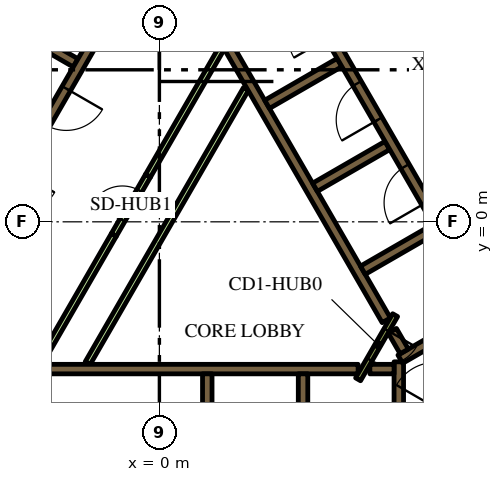
"""IFC4 building model, lengths in metres.
Left out: names, types, materials, properties, quantities, classifications, styles, units other than length and angle.
Written with IfcOpenShell. Run it as: python <this file> out.ifc"""

import sys

from ifc_helpers import new_model, si_unit, direction, frame, frame_2d, origin, place, context, subcontext, project, spatial, rectangle, extrude, element, fill, save


model = new_model("IFC4")
c1 = context("Model", 3, precision=1e-05, world=origin(), true_north=direction((0.0, 1.0)))
c2 = subcontext(c1, "Body", "Model", "MODEL_VIEW")
j1 = project(units=[si_unit("LENGTHUNIT", "METRE"), si_unit("PLANEANGLEUNIT", "RADIAN")], contexts=[c1])
p1 = place(None, origin())
s1 = spatial("IfcSite", under=j1, at=p1, CompositionType="ELEMENT")
p2 = place(p1, origin())
s2 = spatial("IfcBuilding", under=s1, at=p2, CompositionType="ELEMENT")
p3 = place(p2, frame((0.0, 0.0, 300.6)))
s3 = spatial("IfcBuildingStorey", under=s2, at=p3, CompositionType="ELEMENT", Elevation=300.6)
p4 = place(p3, frame((6.3, -7.24, 0.0), z_axis=(0.0, 0.0, 1.0), x_axis=(0.0, 1.0, 0.0)))
e1 = element("IfcWall", 1, at=p4, inside=s3, PredefinedType="SOLIDWALL", context=c2, shape_type="SweptSolid", body=[
    extrude(rectangle(XDim=3.556, YDim=0.25, at=frame_2d((1.778, 0.0))), origin(), (0.0, 0.0, 1.0), 4.2),
])
p5 = place(p3, frame((5.538, -3.875, 0.0), z_axis=(0.0, 0.0, 1.0), x_axis=(1.0, 0.0, 0.0)))
e2 = element("IfcWall", 2, at=p5, inside=s3, PredefinedType="SOLIDWALL", context=c2, shape_type="SweptSolid", body=[
    extrude(rectangle(XDim=0.637, YDim=0.25, at=frame_2d((0.318, 0.0))), origin(), (0.0, 0.0, 1.0), 4.2),
])
p6 = place(p3, frame((-5.259, -3.875, 0.0), z_axis=(0.0, 0.0, 1.0), x_axis=(1.0, 0.0, 0.0)))
e3 = element("IfcWall", 3, at=p6, inside=s3, PredefinedType="SOLIDWALL", context=c2, shape_type="SweptSolid", body=[
    extrude(rectangle(XDim=10.489, YDim=0.25, at=frame_2d((5.244, 0.0))), origin(), (0.0, 0.0, 1.0), 4.2),
])
for number, where, z_axis, x_axis in (
    (4, (1.26, -4.0, 0.0), (0.0, 0.0, 1.0), (0.0, -1.0, 0.0)),
    (5, (3.78, -4.0, 0.0), (0.0, 0.0, 1.0), (0.0, -1.0, 0.0)),
):
    element("IfcWall", number, at=place(p3, frame(where, z_axis=z_axis, x_axis=x_axis)), inside=s3, PredefinedType="SOLIDWALL", context=c2, shape_type="SweptSolid", body=[
        extrude(rectangle(XDim=2.2, YDim=0.25, at=frame_2d((1.1, 0.0))), origin(), (0.0, 0.0, 1.0), 4.2),
    ])
p7 = place(p3, frame((9.19, -1.969, 0.0), z_axis=(0.0, 0.0, 1.0), x_axis=(-0.866057109641, -0.499945079824, 0.0)))
e6 = element("IfcWall", 6, at=p7, inside=s3, PredefinedType="SOLIDWALL", context=c2, shape_type="SweptSolid", body=[
    extrude(rectangle(XDim=3.291, YDim=0.25, at=frame_2d((1.646, 0.0))), origin(), (0.0, 0.0, 1.0), 4.2),
])
p8 = place(p3, frame((6.13, -2.867, 0.0), z_axis=(0.0, 0.0, 1.0), x_axis=(0.500160776593, -0.865932559475, 0.0)))
e7 = element("IfcWall", 7, at=p8, inside=s3, PredefinedType="SOLIDWALL", context=c2, shape_type="SweptSolid", body=[
    extrude(rectangle(XDim=0.627, YDim=0.25, at=frame_2d((0.313, 0.0))), origin(), (0.0, 0.0, 1.0), 4.2),
])
p9 = place(p3, frame((5.97, -2.591, 0.0), z_axis=(0.0, 0.0, 1.0), x_axis=(-0.499994469932, 0.866028596547, 0.0)))
e8 = element("IfcWall", 8, at=p9, inside=s3, PredefinedType="SOLIDWALL", context=c2, shape_type="SweptSolid", body=[
    extrude(rectangle(XDim=10.488, YDim=0.25, at=frame_2d((5.244, 0.0))), origin(), (0.0, 0.0, 1.0), 4.2),
])
for number, where, z_axis, x_axis in (
    (9, (2.834, 3.091, 0.0), (0.0, 0.0, 1.0), (0.866, 0.5, 0.0)),
    (10, (4.094, 0.909, 0.0), (0.0, 0.0, 1.0), (0.866, 0.5, 0.0)),
    (11, (5.354, -1.274, 0.0), (0.0, 0.0, 1.0), (0.866, 0.5, 0.0)),
):
    element("IfcWall", number, at=place(p3, frame(where, z_axis=z_axis, x_axis=x_axis)), inside=s3, PredefinedType="SOLIDWALL", context=c2, shape_type="SweptSolid", body=[
        extrude(rectangle(XDim=2.2, YDim=0.25, at=frame_2d((1.1, 0.0))), origin(), (0.0, 0.0, 1.0), 4.2),
    ])
p10 = place(p3, frame((-8.06, -1.311, 0.0), z_axis=(0.0, 0.0, 1.0), x_axis=(0.50000273126, 0.866023826885, 0.0)))
e12 = element("IfcWall", 12, at=p10, inside=s3, PredefinedType="SOLIDWALL", context=c2, shape_type="SweptSolid", body=[
    extrude(rectangle(XDim=10.33, YDim=0.25, at=frame_2d((5.165, 0.0))), origin(), (0.0, 0.0, 1.0), 4.2),
])
p11 = place(p3, frame((-2.204, 4.182, 0.0), z_axis=(0.0, 0.0, 1.0), x_axis=(-0.866008176907, 0.50002983664, 0.0)))
e13 = element("IfcWall", 13, at=p11, inside=s3, PredefinedType="SOLIDWALL", context=c2, shape_type="SweptSolid", body=[
    extrude(rectangle(XDim=2.2, YDim=0.25, at=frame_2d((1.1, 0.0))), origin(), (0.0, 0.0, 1.0), 4.2),
])
p12 = place(p3, frame((-1.887, -3.718, 0.0), z_axis=(0.0, 0.0, 1.0), x_axis=(0.500005008002, 0.866022512394, 0.0)))
e14 = element("IfcWall", 14, at=p12, inside=s3, PredefinedType="PARTITIONING", context=c2, shape_type="SweptSolid", body=[
    extrude(rectangle(XDim=8.327, YDim=0.15, at=frame_2d((4.164, 0.0))), origin(), (0.0, 0.0, 1.0), 3.55),
])
p13 = place(p3, frame((-3.147, -3.718, 0.0), z_axis=(0.0, 0.0, 1.0), x_axis=(0.500010131483, 0.866019554291, 0.0)))
e15 = element("IfcWall", 15, at=p13, inside=s3, PredefinedType="PARTITIONING", context=c2, shape_type="SweptSolid", body=[
    extrude(rectangle(XDim=3.894, YDim=0.15, at=frame_2d((1.947, 0.0))), origin(), (0.0, 0.0, 1.0), 3.55),
])
p14 = place(p3, frame((-0.3, 1.212, 0.0), z_axis=(0.0, 0.0, 1.0), x_axis=(0.499963101113, 0.866046706318, 0.0)))
e16 = element("IfcWall", 16, at=p14, inside=s3, PredefinedType="PARTITIONING", context=c2, shape_type="SweptSolid", body=[
    extrude(rectangle(XDim=3.893, YDim=0.15, at=frame_2d((1.947, 0.0))), origin(), (0.0, 0.0, 1.0), 3.55),
])
p15 = place(p3, frame((8.565, -2.185, 0.0), z_axis=(0.0, 0.0, 1.0), x_axis=(-0.499997954832, 0.866026584559, 0.0)))
e17 = element("IfcWall", 17, at=p15, inside=s3, PredefinedType="SOLIDWALL", context=c2, shape_type="SweptSolid", body=[
    extrude(rectangle(XDim=12.35, YDim=0.25, at=frame_2d((6.175, 0.0))), origin(), (0.0, 0.0, 1.0), 4.2),
])
p16 = place(p15, frame((0.685, 0.0, 0.0)))
e18 = element("IfcOpeningElement", 18, at=p16, cuts=e17, PredefinedType="OPENING", context=c2, shape_type="SweptSolid", body=[
    extrude(rectangle(XDim=0.9, YDim=2.1, at=frame_2d((0.45, 1.05))), frame((0.0, 0.135, 0.0), z_axis=(0.0, -1.0, 0.0), x_axis=(1.0, 0.0, 0.0)), (0.0, 0.0, 1.0), 0.27),
])
p17 = place(p15, frame((3.105, 0.0, 0.0)))
e19 = element("IfcOpeningElement", 19, at=p17, cuts=e17, PredefinedType="OPENING", context=c2, shape_type="SweptSolid", body=[
    extrude(rectangle(XDim=1.1, YDim=2.1, at=frame_2d((0.55, 1.05))), frame((0.0, 0.135, 0.0), z_axis=(0.0, -1.0, 0.0), x_axis=(1.0, 0.0, 0.0)), (0.0, 0.0, 1.0), 0.27),
])
p18 = place(p15, frame((5.625, 0.0, 0.0)))
e20 = element("IfcOpeningElement", 20, at=p18, cuts=e17, PredefinedType="OPENING", context=c2, shape_type="SweptSolid", body=[
    extrude(rectangle(XDim=1.1, YDim=2.1, at=frame_2d((0.55, 1.05))), frame((0.0, 0.135, 0.0), z_axis=(0.0, -1.0, 0.0), x_axis=(1.0, 0.0, 0.0)), (0.0, 0.0, 1.0), 0.27),
])
p19 = place(p15, frame((8.145, 0.0, 0.0)))
e21 = element("IfcOpeningElement", 21, at=p19, cuts=e17, PredefinedType="OPENING", context=c2, shape_type="SweptSolid", body=[
    extrude(rectangle(XDim=1.1, YDim=2.1, at=frame_2d((0.55, 1.05))), frame((0.0, 0.135, 0.0), z_axis=(0.0, -1.0, 0.0), x_axis=(1.0, 0.0, 0.0)), (0.0, 0.0, 1.0), 0.27),
])
p20 = place(p15, frame((10.665, 0.0, 0.0)))
e22 = element("IfcOpeningElement", 22, at=p20, cuts=e17, PredefinedType="OPENING", context=c2, shape_type="SweptSolid", body=[
    extrude(rectangle(XDim=1.1, YDim=2.1, at=frame_2d((0.55, 1.05))), frame((0.0, 0.135, 0.0), z_axis=(0.0, -1.0, 0.0), x_axis=(1.0, 0.0, 0.0)), (0.0, 0.0, 1.0), 0.27),
])
p21 = place(p3, frame((-0.898, 6.194, 0.0), z_axis=(0.0, 0.0, 1.0), x_axis=(-0.499996202215, -0.866027596426, 0.0)))
e23 = element("IfcWall", 23, at=p21, inside=s3, PredefinedType="SOLIDWALL", context=c2, shape_type="SweptSolid", body=[
    extrude(rectangle(XDim=9.83, YDim=0.25, at=frame_2d((4.915, 0.0))), origin(), (0.0, 0.0, 1.0), 4.2),
])
p22 = place(p21, frame((0.585, 0.0, 0.0)))
e24 = element("IfcOpeningElement", 24, at=p22, cuts=e23, PredefinedType="OPENING", context=c2, shape_type="SweptSolid", body=[
    extrude(rectangle(XDim=1.1, YDim=2.1, at=frame_2d((0.55, 1.05))), frame((0.0, 0.135, 0.0), z_axis=(0.0, -1.0, 0.0), x_axis=(1.0, 0.0, 0.0)), (0.0, 0.0, 1.0), 0.27),
])
p23 = place(p21, frame((3.105, 0.0, 0.0)))
e25 = element("IfcOpeningElement", 25, at=p23, cuts=e23, PredefinedType="OPENING", context=c2, shape_type="SweptSolid", body=[
    extrude(rectangle(XDim=1.1, YDim=2.1, at=frame_2d((0.55, 1.05))), frame((0.0, 0.135, 0.0), z_axis=(0.0, -1.0, 0.0), x_axis=(1.0, 0.0, 0.0)), (0.0, 0.0, 1.0), 0.27),
])
p24 = place(p21, frame((5.625, 0.0, 0.0)))
e26 = element("IfcOpeningElement", 26, at=p24, cuts=e23, PredefinedType="OPENING", context=c2, shape_type="SweptSolid", body=[
    extrude(rectangle(XDim=1.1, YDim=2.1, at=frame_2d((0.55, 1.05))), frame((0.0, 0.135, 0.0), z_axis=(0.0, -1.0, 0.0), x_axis=(1.0, 0.0, 0.0)), (0.0, 0.0, 1.0), 0.27),
])
p25 = place(p21, frame((8.145, 0.0, 0.0)))
e27 = element("IfcOpeningElement", 27, at=p25, cuts=e23, PredefinedType="OPENING", context=c2, shape_type="SweptSolid", body=[
    extrude(rectangle(XDim=1.1, YDim=2.1, at=frame_2d((0.55, 1.05))), frame((0.0, 0.135, 0.0), z_axis=(0.0, -1.0, 0.0), x_axis=(1.0, 0.0, 0.0)), (0.0, 0.0, 1.0), 0.27),
])
p26 = place(p3, frame((7.053, -5.284, 0.0), z_axis=(0.0, 0.0, 1.0), x_axis=(0.500078061341, 0.865980330357, 0.0)))
e28 = element("IfcWall", 28, at=p26, inside=s3, PredefinedType="SOLIDWALL", context=c2, shape_type="SweptSolid", body=[
    extrude(rectangle(XDim=2.1, YDim=0.4, at=frame_2d((1.05, 0.0))), origin(), (0.0, 0.0, 1.0), 4.2),
])
p27 = place(p26, frame((0.45, 0.0, 0.0)))
e29 = element("IfcOpeningElement", 29, at=p27, cuts=e28, PredefinedType="OPENING", context=c2, shape_type="SweptSolid", body=[
    extrude(rectangle(XDim=1.2, YDim=2.1, at=frame_2d((0.6, 1.05))), frame((0.0, 0.21, 0.0), z_axis=(0.0, -1.0, 0.0), x_axis=(1.0, 0.0, 0.0)), (0.0, 0.0, 1.0), 0.42),
])
p28 = place(p3, frame((6.203, -2.456, 0.0), z_axis=(0.0, 0.0, 1.0), x_axis=(-0.500043961785, -0.866000020948, 0.0)))
e30 = element("IfcWall", 30, at=p28, inside=s3, PredefinedType="PARTITIONING", context=c2, shape_type="SweptSolid", body=[
    extrude(rectangle(XDim=1.95, YDim=0.15, at=frame_2d((0.975, 0.0))), origin(), (0.0, 0.0, 1.0), 4.2),
])
p29 = place(p28, frame((0.45, 0.0, 0.0)))
e31 = element("IfcOpeningElement", 31, at=p29, cuts=e30, PredefinedType="OPENING", context=c2, shape_type="SweptSolid", body=[
    extrude(rectangle(XDim=0.9, YDim=2.1, at=frame_2d((0.45, 1.05))), frame((0.0, 0.085, 0.0), z_axis=(0.0, -1.0, 0.0), x_axis=(1.0, 0.0, 0.0)), (0.0, 0.0, 1.0), 0.17),
])
p30 = place(p3, frame((-1.2, -0.346, 0.0), z_axis=(0.0, 0.0, 1.0), x_axis=(0.499961193289, 0.866047807691, 0.0)))
e32 = element("IfcWall", 32, at=p30, inside=s3, PredefinedType="PARTITIONING", context=c2, shape_type="SweptSolid", body=[
    extrude(rectangle(XDim=1.8, YDim=0.15, at=frame_2d((0.9, 0.0))), origin(), (0.0, 0.0, 1.0), 3.55),
])
p31 = place(p30, frame((0.45, 0.0, 0.0)))
e33 = element("IfcOpeningElement", 33, at=p31, cuts=e32, PredefinedType="OPENING", context=c2, shape_type="SweptSolid", body=[
    extrude(rectangle(XDim=0.9, YDim=2.1, at=frame_2d((0.45, 1.05))), frame((0.0, 0.085, 0.0), z_axis=(0.0, -1.0, 0.0), x_axis=(1.0, 0.0, 0.0)), (0.0, 0.0, 1.0), 0.17),
])
p32 = place(p17, origin())
e34 = element("IfcDoor", 34, at=p32, inside=s3, OperationType="DOUBLE_DOOR_SLIDING", PredefinedType="DOOR", context=c2, shape_type="SweptSolid", body=[
    extrude(rectangle(XDim=1.1, YDim=2.1, at=frame_2d((0.55, 1.05))), frame((0.0, 0.025, 0.0), z_axis=(0.0, -1.0, 0.0), x_axis=(1.0, 0.0, 0.0)), (0.0, 0.0, 1.0), 0.05),
])
fill(e19, e34)
p33 = place(p18, origin())
e35 = element("IfcDoor", 35, at=p33, inside=s3, OperationType="DOUBLE_DOOR_SLIDING", PredefinedType="DOOR", context=c2, shape_type="SweptSolid", body=[
    extrude(rectangle(XDim=1.1, YDim=2.1, at=frame_2d((0.55, 1.05))), frame((0.0, 0.025, 0.0), z_axis=(0.0, -1.0, 0.0), x_axis=(1.0, 0.0, 0.0)), (0.0, 0.0, 1.0), 0.05),
])
fill(e20, e35)
p34 = place(p23, origin())
e36 = element("IfcDoor", 36, at=p34, inside=s3, OperationType="DOUBLE_DOOR_SLIDING", PredefinedType="DOOR", context=c2, shape_type="SweptSolid", body=[
    extrude(rectangle(XDim=1.1, YDim=2.1, at=frame_2d((0.55, 1.05))), frame((0.0, 0.025, 0.0), z_axis=(0.0, -1.0, 0.0), x_axis=(1.0, 0.0, 0.0)), (0.0, 0.0, 1.0), 0.05),
])
fill(e25, e36)
p35 = place(p29, origin())
e37 = element("IfcDoor", 37, at=p35, inside=s3, OperationType="SINGLE_SWING_LEFT", PredefinedType="DOOR", context=c2, shape_type="SweptSolid", body=[
    extrude(rectangle(XDim=0.9, YDim=2.1, at=frame_2d((0.45, 1.05))), frame((0.0, 0.025, 0.0), z_axis=(0.0, -1.0, 0.0), x_axis=(1.0, 0.0, 0.0)), (0.0, 0.0, 1.0), 0.05),
])
fill(e31, e37)
p36 = place(p31, origin())
e38 = element("IfcDoor", 38, at=p36, inside=s3, OperationType="SINGLE_SWING_LEFT", PredefinedType="DOOR", context=c2, shape_type="SweptSolid", body=[
    extrude(rectangle(XDim=0.9, YDim=2.1, at=frame_2d((0.45, 1.05))), frame((0.0, 0.025, 0.0), z_axis=(0.0, -1.0, 0.0), x_axis=(1.0, 0.0, 0.0)), (0.0, 0.0, 1.0), 0.05),
])
fill(e33, e38)
save(model, sys.argv[1])
